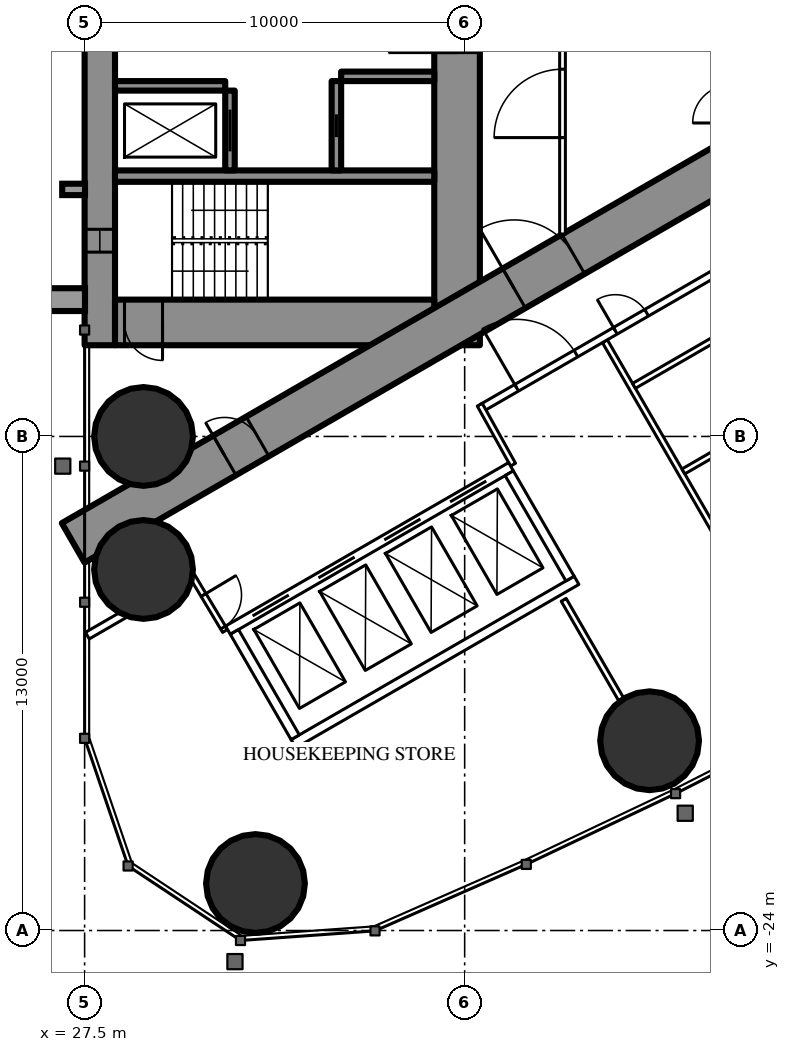
"""IFC4 building model, lengths in metres.
Left out: names, types, materials, properties, quantities, classifications, styles, units other than length and angle.
Written with IfcOpenShell. Run it as: python <this file> out.ifc"""

import sys

from ifc_helpers import new_model, si_unit, direction, frame, frame_2d, origin, origin_2d, place, context, subcontext, project, spatial, rectangle, hollow_circle, extrude, element, fill, save


model = new_model("IFC4")
c1 = context("Model", 3, precision=1e-05, world=origin(), true_north=direction((0.0, 1.0)))
c2 = subcontext(c1, "Body", "Model", "MODEL_VIEW")
j1 = project(units=[si_unit("LENGTHUNIT", "METRE"), si_unit("PLANEANGLEUNIT", "RADIAN")], contexts=[c1])
p1 = place(None, origin())
s1 = spatial("IfcSite", under=j1, at=p1, CompositionType="ELEMENT")
p2 = place(p1, origin())
s2 = spatial("IfcBuilding", under=s1, at=p2, CompositionType="ELEMENT")
p3 = place(p2, frame((0.0, 0.0, 90.6)))
s3 = spatial("IfcBuildingStorey", under=s2, at=p3, CompositionType="ELEMENT", Elevation=90.6)
for number, where, z_axis, x_axis in (
    (1, (31.996, -22.763, 0.0), (0.0, 0.0, 1.0), (1.0, 0.0, 0.0)),
    (2, (29.05, -11.0, 0.0), (0.0, 0.0, 1.0), (1.0, 0.0, 0.0)),
    (3, (29.05, -14.5, 0.0), (0.0, 0.0, 1.0), (1.0, 0.0, 0.0)),
    (4, (42.366, -19.007, 0.0), (0.0, 0.0, 1.0), (1.0, 0.0, 0.0)),
):
    element("IfcColumn", number, at=place(p3, frame(where, z_axis=z_axis, x_axis=x_axis)), inside=s3, PredefinedType="COLUMN", context=c2, shape_type="SweptSolid", body=[
        extrude(hollow_circle(Radius=1.3, WallThickness=0.1, at=origin_2d()), origin(), (0.0, 0.0, 1.0), 3.5),
    ])
p4 = place(p3, frame((27.9, -8.6, 0.0), z_axis=(0.0, 0.0, 1.0), x_axis=(0.0, 1.0, 0.0)))
e5 = element("IfcWall", 5, at=p4, inside=s3, PredefinedType="SHEAR", context=c2, shape_type="SweptSolid", body=[
    extrude(rectangle(XDim=17.2, YDim=0.8, at=frame_2d((8.6, 0.0))), origin(), (0.0, 0.0, 1.0), 3.5),
])
p5 = place(p4, frame((2.45, 0.0, 0.6)))
e6 = element("IfcOpeningElement", 6, at=p5, cuts=e5, PredefinedType="OPENING", context=c2, shape_type="SweptSolid", body=[
    extrude(rectangle(XDim=0.6, YDim=2.1, at=frame_2d((0.3, 1.05))), frame((0.0, 0.41, 0.0), z_axis=(0.0, -1.0, 0.0), x_axis=(1.0, 0.0, 0.0)), (0.0, 0.0, 1.0), 0.82),
])
p6 = place(p4, frame((14.15, 0.0, 0.6)))
e7 = element("IfcOpeningElement", 7, at=p6, cuts=e5, PredefinedType="OPENING", context=c2, shape_type="SweptSolid", body=[
    extrude(rectangle(XDim=0.6, YDim=2.1, at=frame_2d((0.3, 1.05))), frame((0.0, 0.41, 0.0), z_axis=(0.0, -1.0, 0.0), x_axis=(1.0, 0.0, 0.0)), (0.0, 0.0, 1.0), 0.82),
])
p7 = place(p3, frame((37.3, -8.6, 0.0), z_axis=(0.0, 0.0, 1.0), x_axis=(0.0, 1.0, 0.0)))
e8 = element("IfcWall", 8, at=p7, inside=s3, PredefinedType="SHEAR", context=c2, shape_type="SweptSolid", body=[
    extrude(rectangle(XDim=17.2, YDim=1.2, at=frame_2d((8.6, 0.0))), origin(), (0.0, 0.0, 1.0), 3.5),
])
p8 = place(p7, frame((7.7, 0.0, 0.0)))
e9 = element("IfcOpeningElement", 9, at=p8, cuts=e8, PredefinedType="OPENING", context=c2, shape_type="SweptSolid", body=[
    extrude(rectangle(XDim=1.8, YDim=2.2, at=frame_2d((0.9, 1.1))), frame((0.0, 0.61, 0.0), z_axis=(0.0, -1.0, 0.0), x_axis=(1.0, 0.0, 0.0)), (0.0, 0.0, 1.0), 1.22),
])
p9 = place(p3, frame((28.3, -8.0, 0.0), z_axis=(0.0, 0.0, 1.0), x_axis=(1.0, 0.0, 0.0)))
e10 = element("IfcWall", 10, at=p9, inside=s3, PredefinedType="SHEAR", context=c2, shape_type="SweptSolid", body=[
    extrude(rectangle(XDim=8.4, YDim=1.2, at=frame_2d((4.2, 0.0))), origin(), (0.0, 0.0, 1.0), 3.5),
])
p10 = place(p9, frame((0.25, 0.0, 0.0)))
e11 = element("IfcOpeningElement", 11, at=p10, cuts=e10, PredefinedType="OPENING", context=c2, shape_type="SweptSolid", body=[
    extrude(rectangle(XDim=1.0, YDim=2.2, at=frame_2d((0.5, 1.1))), frame((0.0, 0.61, 0.0), z_axis=(0.0, -1.0, 0.0), x_axis=(1.0, 0.0, 0.0)), (0.0, 0.0, 1.0), 1.22),
])
p11 = place(p3, frame((28.3, -4.15, 0.0), z_axis=(0.0, 0.0, 1.0), x_axis=(1.0, 0.0, 0.0)))
e12 = element("IfcWall", 12, at=p11, inside=s3, PredefinedType="SHEAR", context=c2, shape_type="SweptSolid", body=[
    extrude(rectangle(XDim=8.4, YDim=0.3, at=frame_2d((4.2, 0.0))), origin(), (0.0, 0.0, 1.0), 3.5),
])
p12 = place(p3, frame((31.325, -4.0, 0.0), z_axis=(0.0, 0.0, 1.0), x_axis=(0.0, 1.0, 0.0)))
e13 = element("IfcWall", 13, at=p12, inside=s3, PredefinedType="SHEAR", context=c2, shape_type="SweptSolid", body=[
    extrude(rectangle(XDim=2.1, YDim=0.25, at=frame_2d((1.05, 0.0))), origin(), (0.0, 0.0, 1.0), 3.5),
])
p13 = place(p12, frame((0.5, 0.0, 0.0)))
e14 = element("IfcOpeningElement", 14, at=p13, cuts=e13, PredefinedType="OPENING", context=c2, shape_type="SweptSolid", body=[
    extrude(rectangle(XDim=1.1, YDim=2.2, at=frame_2d((0.55, 1.1))), frame((0.0, 0.135, 0.0), z_axis=(0.0, -1.0, 0.0), x_axis=(1.0, 0.0, 0.0)), (0.0, 0.0, 1.0), 0.27),
])
p14 = place(p3, frame((34.125, -4.0, 0.0), z_axis=(0.0, 0.0, 1.0), x_axis=(0.0, 1.0, 0.0)))
e15 = element("IfcWall", 15, at=p14, inside=s3, PredefinedType="SHEAR", context=c2, shape_type="SweptSolid", body=[
    extrude(rectangle(XDim=2.35, YDim=0.25, at=frame_2d((1.175, 0.0))), origin(), (0.0, 0.0, 1.0), 3.5),
])
p15 = place(p14, frame((0.875, 0.0, 0.0)))
e16 = element("IfcOpeningElement", 16, at=p15, cuts=e15, PredefinedType="OPENING", context=c2, shape_type="SweptSolid", body=[
    extrude(rectangle(XDim=0.6, YDim=2.0, at=frame_2d((0.3, 1.0))), frame((0.0, 0.135, 0.0), z_axis=(0.0, -1.0, 0.0), x_axis=(1.0, 0.0, 0.0)), (0.0, 0.0, 1.0), 0.27),
])
p16 = place(p3, frame((28.3, -1.775, 0.0), z_axis=(0.0, 0.0, 1.0), x_axis=(1.0, 0.0, 0.0)))
e17 = element("IfcWall", 17, at=p16, inside=s3, PredefinedType="SHEAR", context=c2, shape_type="SweptSolid", body=[
    extrude(rectangle(XDim=2.9, YDim=0.25, at=frame_2d((1.45, 0.0))), origin(), (0.0, 0.0, 1.0), 3.5),
])
p17 = place(p3, frame((34.25, -1.525, 0.0), z_axis=(0.0, 0.0, 1.0), x_axis=(1.0, 0.0, 0.0)))
e18 = element("IfcWall", 18, at=p17, inside=s3, PredefinedType="SHEAR", context=c2, shape_type="SweptSolid", body=[
    extrude(rectangle(XDim=2.45, YDim=0.25, at=frame_2d((1.225, 0.0))), origin(), (0.0, 0.0, 1.0), 3.5),
])
p18 = place(p3, frame((27.2, -13.8, 0.0), z_axis=(0.0, 0.0, 1.0), x_axis=(0.866027159892, 0.499996958321, 0.0)))
e19 = element("IfcWall", 19, at=p18, inside=s3, PredefinedType="SHEAR", context=c2, shape_type="SweptSolid", body=[
    extrude(rectangle(XDim=27.947, YDim=1.2, at=frame_2d((13.973, 0.0))), origin(), (0.0, 0.0, 1.0), 3.5),
])
p19 = place(p18, frame((4.6, 0.0, 0.0)))
e20 = element("IfcOpeningElement", 20, at=p19, cuts=e19, PredefinedType="OPENING", context=c2, shape_type="SweptSolid", body=[
    extrude(rectangle(XDim=1.0, YDim=2.2, at=frame_2d((0.5, 1.1))), frame((0.0, 0.61, 0.0), z_axis=(0.0, -1.0, 0.0), x_axis=(1.0, 0.0, 0.0)), (0.0, 0.0, 1.0), 1.22),
])
p20 = place(p18, frame((13.395, 0.0, 0.0)))
e21 = element("IfcOpeningElement", 21, at=p20, cuts=e19, PredefinedType="OPENING", context=c2, shape_type="SweptSolid", body=[
    extrude(rectangle(XDim=1.8, YDim=2.2, at=frame_2d((0.9, 1.1))), frame((0.0, 0.61, 0.0), z_axis=(0.0, -1.0, 0.0), x_axis=(1.0, 0.0, 0.0)), (0.0, 0.0, 1.0), 1.22),
])
p21 = place(p3, frame((41.19, -8.494, 0.0), z_axis=(0.0, 0.0, 1.0), x_axis=(0.49999258054, -0.866029687369, 0.0)))
e22 = element("IfcWall", 22, at=p21, inside=s3, PredefinedType="PARTITIONING", context=c2, shape_type="SweptSolid", body=[
    extrude(rectangle(XDim=11.318, YDim=0.15, at=frame_2d((5.659, 0.0))), origin(), (0.0, 0.0, 1.0), 3.25),
])
p22 = place(p3, frame((40.105, -15.299, 0.0), z_axis=(0.0, 0.0, 1.0), x_axis=(0.499978822259, -0.866037630414, 0.0)))
e23 = element("IfcWall", 23, at=p22, inside=s3, PredefinedType="PARTITIONING", context=c2, shape_type="SweptSolid", body=[
    extrude(rectangle(XDim=3.023, YDim=0.15, at=frame_2d((1.511, 0.0))), origin(), (0.0, 0.0, 1.0), 3.25),
])
p23 = place(p3, frame((27.572, -16.241, 0.0), z_axis=(0.0, 0.0, 1.0), x_axis=(0.866029654818, 0.499992636921, 0.0)))
e24 = element("IfcWall", 24, at=p23, inside=s3, PredefinedType="PARTITIONING", context=c2, shape_type="SweptSolid", body=[
    extrude(rectangle(XDim=3.155, YDim=0.2, at=frame_2d((1.577, 0.0))), origin(), (0.0, 0.0, 1.0), 3.25),
])
p24 = place(p3, frame((37.96, -10.243, 0.0), z_axis=(0.0, 0.0, 1.0), x_axis=(0.866026429433, 0.499998223521, 0.0)))
e25 = element("IfcWall", 25, at=p24, inside=s3, PredefinedType="PARTITIONING", context=c2, shape_type="SweptSolid", body=[
    extrude(rectangle(XDim=20.487, YDim=0.2, at=frame_2d((10.243, 0.0))), origin(), (0.0, 0.0, 1.0), 3.25),
])
p25 = place(p24, frame((4.047, 0.0, 0.0)))
e26 = element("IfcOpeningElement", 26, at=p25, cuts=e25, PredefinedType="OPENING", context=c2, shape_type="SweptSolid", body=[
    extrude(rectangle(XDim=0.95, YDim=2.2, at=frame_2d((0.475, 1.1))), frame((0.0, 0.11, 0.0), z_axis=(0.0, -1.0, 0.0), x_axis=(1.0, 0.0, 0.0)), (0.0, 0.0, 1.0), 0.22),
])
p26 = place(p24, frame((11.04, 0.0, 0.0)))
e27 = element("IfcOpeningElement", 27, at=p26, cuts=e25, PredefinedType="OPENING", context=c2, shape_type="SweptSolid", body=[
    extrude(rectangle(XDim=0.95, YDim=2.2, at=frame_2d((0.475, 1.1))), frame((0.0, 0.11, 0.0), z_axis=(0.0, -1.0, 0.0), x_axis=(1.0, 0.0, 0.0)), (0.0, 0.0, 1.0), 0.22),
])
p27 = place(p24, frame((13.035, 0.0, 0.0)))
e28 = element("IfcOpeningElement", 28, at=p27, cuts=e25, PredefinedType="OPENING", context=c2, shape_type="SweptSolid", body=[
    extrude(rectangle(XDim=0.95, YDim=2.2, at=frame_2d((0.475, 1.1))), frame((0.0, 0.11, 0.0), z_axis=(0.0, -1.0, 0.0), x_axis=(1.0, 0.0, 0.0)), (0.0, 0.0, 1.0), 0.22),
])
p28 = place(p24, frame((17.085, 0.0, 0.0)))
e29 = element("IfcOpeningElement", 29, at=p28, cuts=e25, PredefinedType="OPENING", context=c2, shape_type="SweptSolid", body=[
    extrude(rectangle(XDim=0.95, YDim=2.2, at=frame_2d((0.475, 1.1))), frame((0.0, 0.11, 0.0), z_axis=(0.0, -1.0, 0.0), x_axis=(1.0, 0.0, 0.0)), (0.0, 0.0, 1.0), 0.22),
])
p29 = place(p24, frame((1.048, 0.0, 0.0)))
e30 = element("IfcOpeningElement", 30, at=p29, cuts=e25, PredefinedType="OPENING", context=c2, shape_type="SweptSolid", body=[
    extrude(rectangle(XDim=1.8, YDim=2.2, at=frame_2d((0.9, 1.1))), frame((0.0, 0.11, 0.0), z_axis=(0.0, -1.0, 0.0), x_axis=(1.0, 0.0, 0.0)), (0.0, 0.0, 1.0), 0.22),
])
p30 = place(p3, frame((30.267, -14.569, 0.0), z_axis=(0.0, 0.0, 1.0), x_axis=(0.514336634837, -0.857588377991, 0.0)))
e31 = element("IfcWall", 31, at=p30, inside=s3, PredefinedType="PARTITIONING", context=c2, shape_type="SweptSolid", body=[
    extrude(rectangle(XDim=1.805, YDim=0.15, at=frame_2d((0.903, 0.0))), origin(), (0.0, 0.0, 1.0), 3.25),
])
p31 = place(p30, frame((0.703, 0.0, 0.0)))
e32 = element("IfcOpeningElement", 32, at=p31, cuts=e31, PredefinedType="OPENING", context=c2, shape_type="SweptSolid", body=[
    extrude(rectangle(XDim=1.0, YDim=2.2, at=frame_2d((0.5, 1.1))), frame((0.0, 0.085, 0.0), z_axis=(0.0, -1.0, 0.0), x_axis=(1.0, 0.0, 0.0)), (0.0, 0.0, 1.0), 0.17),
])
p32 = place(p3, frame((38.773, -11.742, 0.0), z_axis=(0.0, 0.0, 1.0), x_axis=(-0.485528096672, 0.8742210632, 0.0)))
e33 = element("IfcWall", 33, at=p32, inside=s3, PredefinedType="PARTITIONING", context=c2, shape_type="SweptSolid", body=[
    extrude(rectangle(XDim=1.805, YDim=0.15, at=frame_2d((0.903, 0.0))), origin(), (0.0, 0.0, 1.0), 3.25),
])
p33 = place(p3, frame((43.255, -11.921, 0.0), z_axis=(0.0, 0.0, 1.0), x_axis=(0.866006523861, 0.500032699561, 0.0)))
e34 = element("IfcWall", 34, at=p33, inside=s3, PredefinedType="PARTITIONING", context=c2, shape_type="SweptSolid", body=[
    extrude(rectangle(XDim=2.475, YDim=0.15, at=frame_2d((1.237, 0.0))), origin(), (0.0, 0.0, 1.0), 3.25),
])
p34 = place(p3, frame((44.033, -8.469, 0.0), z_axis=(0.0, 0.0, 1.0), x_axis=(0.500047596559, -0.865997922154, 0.0)))
e35 = element("IfcWall", 35, at=p34, inside=s3, PredefinedType="PARTITIONING", context=c2, shape_type="SweptSolid", body=[
    extrude(rectangle(XDim=2.6, YDim=0.15, at=frame_2d((1.3, 0.0))), origin(), (0.0, 0.0, 1.0), 3.25),
])
p35 = place(p34, frame((0.9, 0.0, 0.0)))
e36 = element("IfcOpeningElement", 36, at=p35, cuts=e35, PredefinedType="OPENING", context=c2, shape_type="SweptSolid", body=[
    extrude(rectangle(XDim=0.8, YDim=2.2, at=frame_2d((0.4, 1.1))), frame((0.0, 0.085, 0.0), z_axis=(0.0, -1.0, 0.0), x_axis=(1.0, 0.0, 0.0)), (0.0, 0.0, 1.0), 0.17),
])
p36 = place(p3, frame((41.955, -9.669, 0.0), z_axis=(0.0, 0.0, 1.0), x_axis=(0.866006523861, 0.500032699561, 0.0)))
e37 = element("IfcWall", 37, at=p36, inside=s3, PredefinedType="PARTITIONING", context=c2, shape_type="SweptSolid", body=[
    extrude(rectangle(XDim=2.475, YDim=0.15, at=frame_2d((1.237, 0.0))), origin(), (0.0, 0.0, 1.0), 3.25),
])
p37 = place(p3, frame((40.075, -5.674, 0.0), z_axis=(0.0, 0.0, 1.0), x_axis=(0.0, 1.0, 0.0)))
e38 = element("IfcWall", 38, at=p37, inside=s3, PredefinedType="PARTITIONING", context=c2, shape_type="SweptSolid", body=[
    extrude(rectangle(XDim=6.874, YDim=0.15, at=frame_2d((3.437, 0.0))), origin(), (0.0, 0.0, 1.0), 3.25),
])
p38 = place(p37, frame((2.537, 0.0, 0.0)))
e39 = element("IfcOpeningElement", 39, at=p38, cuts=e38, PredefinedType="OPENING", context=c2, shape_type="SweptSolid", body=[
    extrude(rectangle(XDim=1.8, YDim=2.2, at=frame_2d((0.9, 1.1))), frame((0.0, 0.085, 0.0), z_axis=(0.0, -1.0, 0.0), x_axis=(1.0, 0.0, 0.0)), (0.0, 0.0, 1.0), 0.17),
])
p39 = place(p3, frame((31.271, -16.097, 0.0), z_axis=(0.0, 0.0, 1.0), x_axis=(0.86604045752, 0.499973925258, 0.0)))
e40 = element("IfcWall", 40, at=p39, inside=s3, PredefinedType="PARTITIONING", context=c2, shape_type="SweptSolid", body=[
    extrude(rectangle(XDim=8.6, YDim=0.25, at=frame_2d((4.3, 0.0))), origin(), (0.0, 0.0, 1.0), 3.25),
])
p40 = place(p39, frame((0.75, 0.0, 0.0)))
e41 = element("IfcOpeningElement", 41, at=p40, cuts=e40, PredefinedType="OPENING", context=c2, shape_type="SweptSolid", body=[
    extrude(rectangle(XDim=1.1, YDim=2.2, at=frame_2d((0.55, 1.1))), frame((0.0, 0.135, 0.0), z_axis=(0.0, -1.0, 0.0), x_axis=(1.0, 0.0, 0.0)), (0.0, 0.0, 1.0), 0.27),
])
p41 = place(p39, frame((2.75, 0.0, 0.0)))
e42 = element("IfcOpeningElement", 42, at=p41, cuts=e40, PredefinedType="OPENING", context=c2, shape_type="SweptSolid", body=[
    extrude(rectangle(XDim=1.1, YDim=2.2, at=frame_2d((0.55, 1.1))), frame((0.0, 0.135, 0.0), z_axis=(0.0, -1.0, 0.0), x_axis=(1.0, 0.0, 0.0)), (0.0, 0.0, 1.0), 0.27),
])
p42 = place(p39, frame((4.75, 0.0, 0.0)))
e43 = element("IfcOpeningElement", 43, at=p42, cuts=e40, PredefinedType="OPENING", context=c2, shape_type="SweptSolid", body=[
    extrude(rectangle(XDim=1.1, YDim=2.2, at=frame_2d((0.55, 1.1))), frame((0.0, 0.135, 0.0), z_axis=(0.0, -1.0, 0.0), x_axis=(1.0, 0.0, 0.0)), (0.0, 0.0, 1.0), 0.27),
])
p43 = place(p39, frame((6.75, 0.0, 0.0)))
e44 = element("IfcOpeningElement", 44, at=p43, cuts=e40, PredefinedType="OPENING", context=c2, shape_type="SweptSolid", body=[
    extrude(rectangle(XDim=1.1, YDim=2.2, at=frame_2d((0.55, 1.1))), frame((0.0, 0.135, 0.0), z_axis=(0.0, -1.0, 0.0), x_axis=(1.0, 0.0, 0.0)), (0.0, 0.0, 1.0), 0.27),
])
p44 = place(p3, frame((32.996, -19.086, 0.0), z_axis=(0.0, 0.0, 1.0), x_axis=(0.866028165386, 0.499995216735, 0.0)))
e45 = element("IfcWall", 45, at=p44, inside=s3, PredefinedType="PARTITIONING", context=c2, shape_type="SweptSolid", body=[
    extrude(rectangle(XDim=8.6, YDim=0.25, at=frame_2d((4.3, 0.0))), origin(), (0.0, 0.0, 1.0), 3.25),
])
for number, where, z_axis, x_axis in (
    (46, (31.441, -16.143, 0.0), (0.0, 0.0, 1.0), (0.5, -0.866, 0.0)),
    (47, (38.673, -11.968, 0.0), (0.0, 0.0, 1.0), (0.5, -0.866, 0.0)),
):
    element("IfcWall", number, at=place(p3, frame(where, z_axis=z_axis, x_axis=x_axis)), inside=s3, PredefinedType="PARTITIONING", context=c2, shape_type="SweptSolid", body=[
        extrude(rectangle(XDim=3.201, YDim=0.25, at=frame_2d((1.6, 0.0))), origin(), (0.0, 0.0, 1.0), 3.25),
    ])
p45 = place(p25, origin())
e48 = element("IfcDoor", 48, at=p45, inside=s3, OperationType="SINGLE_SWING_LEFT", PredefinedType="DOOR", context=c2, shape_type="SweptSolid", body=[
    extrude(rectangle(XDim=0.95, YDim=2.2, at=frame_2d((0.475, 1.1))), frame((0.0, 0.025, 0.0), z_axis=(0.0, -1.0, 0.0), x_axis=(1.0, 0.0, 0.0)), (0.0, 0.0, 1.0), 0.05),
])
fill(e26, e48)
p46 = place(p31, origin())
e49 = element("IfcDoor", 49, at=p46, inside=s3, OperationType="SINGLE_SWING_LEFT", PredefinedType="DOOR", context=c2, shape_type="SweptSolid", body=[
    extrude(rectangle(XDim=1.0, YDim=2.2, at=frame_2d((0.5, 1.1))), frame((0.0, 0.025, 0.0), z_axis=(0.0, -1.0, 0.0), x_axis=(1.0, 0.0, 0.0)), (0.0, 0.0, 1.0), 0.05),
])
fill(e32, e49)
p47 = place(p29, origin())
e50 = element("IfcDoor", 50, at=p47, inside=s3, OperationType="DOUBLE_DOOR_SINGLE_SWING", PredefinedType="DOOR", context=c2, shape_type="SweptSolid", body=[
    extrude(rectangle(XDim=1.8, YDim=2.2, at=frame_2d((0.9, 1.1))), frame((0.0, 0.025, 0.0), z_axis=(0.0, -1.0, 0.0), x_axis=(1.0, 0.0, 0.0)), (0.0, 0.0, 1.0), 0.05),
])
fill(e30, e50)
p48 = place(p38, origin())
e51 = element("IfcDoor", 51, at=p48, inside=s3, OperationType="DOUBLE_DOOR_SINGLE_SWING", PredefinedType="DOOR", context=c2, shape_type="SweptSolid", body=[
    extrude(rectangle(XDim=1.8, YDim=2.2, at=frame_2d((0.9, 1.1))), frame((0.0, 0.025, 0.0), z_axis=(0.0, -1.0, 0.0), x_axis=(1.0, 0.0, 0.0)), (0.0, 0.0, 1.0), 0.05),
])
fill(e39, e51)
p49 = place(p19, origin())
e52 = element("IfcDoor", 52, at=p49, inside=s3, OperationType="SINGLE_SWING_LEFT", PredefinedType="DOOR", context=c2, shape_type="SweptSolid", body=[
    extrude(rectangle(XDim=1.0, YDim=2.2, at=frame_2d((0.5, 1.1))), frame((0.0, 0.025, 0.0), z_axis=(0.0, -1.0, 0.0), x_axis=(1.0, 0.0, 0.0)), (0.0, 0.0, 1.0), 0.05),
])
fill(e20, e52)
p50 = place(p20, origin())
e53 = element("IfcDoor", 53, at=p50, inside=s3, OperationType="DOUBLE_DOOR_SINGLE_SWING", PredefinedType="DOOR", context=c2, shape_type="SweptSolid", body=[
    extrude(rectangle(XDim=1.8, YDim=2.2, at=frame_2d((0.9, 1.1))), frame((0.0, 0.025, 0.0), z_axis=(0.0, -1.0, 0.0), x_axis=(1.0, 0.0, 0.0)), (0.0, 0.0, 1.0), 0.05),
])
fill(e21, e53)
p51 = place(p8, origin())
e54 = element("IfcDoor", 54, at=p51, inside=s3, OperationType="DOUBLE_DOOR_SINGLE_SWING", PredefinedType="DOOR", context=c2, shape_type="SweptSolid", body=[
    extrude(rectangle(XDim=1.8, YDim=2.2, at=frame_2d((0.9, 1.1))), frame((0.0, 0.025, 0.0), z_axis=(0.0, -1.0, 0.0), x_axis=(1.0, 0.0, 0.0)), (0.0, 0.0, 1.0), 0.05),
])
fill(e9, e54)
p52 = place(p10, origin())
e55 = element("IfcDoor", 55, at=p52, inside=s3, OperationType="SINGLE_SWING_RIGHT", PredefinedType="DOOR", context=c2, shape_type="SweptSolid", body=[
    extrude(rectangle(XDim=1.0, YDim=2.2, at=frame_2d((0.5, 1.1))), frame((0.0, 0.025, 0.0), z_axis=(0.0, -1.0, 0.0), x_axis=(1.0, 0.0, 0.0)), (0.0, 0.0, 1.0), 0.05),
])
fill(e11, e55)
p53 = place(p13, origin())
e56 = element("IfcDoor", 56, at=p53, inside=s3, OperationType="SLIDING_TO_LEFT", PredefinedType="USERDEFINED", context=c2, shape_type="SweptSolid", body=[
    extrude(rectangle(XDim=1.1, YDim=2.2, at=frame_2d((0.55, 1.1))), frame((0.0, 0.025, 0.0), z_axis=(0.0, -1.0, 0.0), x_axis=(1.0, 0.0, 0.0)), (0.0, 0.0, 1.0), 0.05),
])
fill(e14, e56)
p54 = place(p15, origin())
e57 = element("IfcDoor", 57, at=p54, inside=s3, OperationType="SLIDING_TO_LEFT", PredefinedType="DOOR", context=c2, shape_type="SweptSolid", body=[
    extrude(rectangle(XDim=0.6, YDim=2.0, at=frame_2d((0.3, 1.0))), frame((0.0, 0.025, 0.0), z_axis=(0.0, -1.0, 0.0), x_axis=(1.0, 0.0, 0.0)), (0.0, 0.0, 1.0), 0.05),
])
fill(e16, e57)
p55 = place(p40, origin())
e58 = element("IfcDoor", 58, at=p55, inside=s3, OperationType="DOUBLE_DOOR_SLIDING", PredefinedType="USERDEFINED", context=c2, shape_type="SweptSolid", body=[
    extrude(rectangle(XDim=1.1, YDim=2.2, at=frame_2d((0.55, 1.1))), frame((0.0, 0.025, 0.0), z_axis=(0.0, -1.0, 0.0), x_axis=(1.0, 0.0, 0.0)), (0.0, 0.0, 1.0), 0.05),
])
fill(e41, e58)
p56 = place(p41, origin())
e59 = element("IfcDoor", 59, at=p56, inside=s3, OperationType="DOUBLE_DOOR_SLIDING", PredefinedType="USERDEFINED", context=c2, shape_type="SweptSolid", body=[
    extrude(rectangle(XDim=1.1, YDim=2.2, at=frame_2d((0.55, 1.1))), frame((0.0, 0.025, 0.0), z_axis=(0.0, -1.0, 0.0), x_axis=(1.0, 0.0, 0.0)), (0.0, 0.0, 1.0), 0.05),
])
fill(e42, e59)
p57 = place(p42, origin())
e60 = element("IfcDoor", 60, at=p57, inside=s3, OperationType="DOUBLE_DOOR_SLIDING", PredefinedType="USERDEFINED", context=c2, shape_type="SweptSolid", body=[
    extrude(rectangle(XDim=1.1, YDim=2.2, at=frame_2d((0.55, 1.1))), frame((0.0, 0.025, 0.0), z_axis=(0.0, -1.0, 0.0), x_axis=(1.0, 0.0, 0.0)), (0.0, 0.0, 1.0), 0.05),
])
fill(e43, e60)
p58 = place(p43, origin())
e61 = element("IfcDoor", 61, at=p58, inside=s3, OperationType="DOUBLE_DOOR_SLIDING", PredefinedType="USERDEFINED", context=c2, shape_type="SweptSolid", body=[
    extrude(rectangle(XDim=1.1, YDim=2.2, at=frame_2d((0.55, 1.1))), frame((0.0, 0.025, 0.0), z_axis=(0.0, -1.0, 0.0), x_axis=(1.0, 0.0, 0.0)), (0.0, 0.0, 1.0), 0.05),
])
fill(e44, e61)
p59 = place(p5, origin())
e62 = element("IfcWindow", 62, at=p59, inside=s3, PartitioningType="SINGLE_PANEL", PredefinedType="WINDOW", context=c2, shape_type="SweptSolid", body=[
    extrude(rectangle(XDim=0.6, YDim=2.1, at=frame_2d((0.3, 1.05))), frame((0.0, 0.03, 0.0), z_axis=(0.0, -1.0, 0.0), x_axis=(1.0, 0.0, 0.0)), (0.0, 0.0, 1.0), 0.06),
])
fill(e6, e62)
save(model, sys.argv[1])
